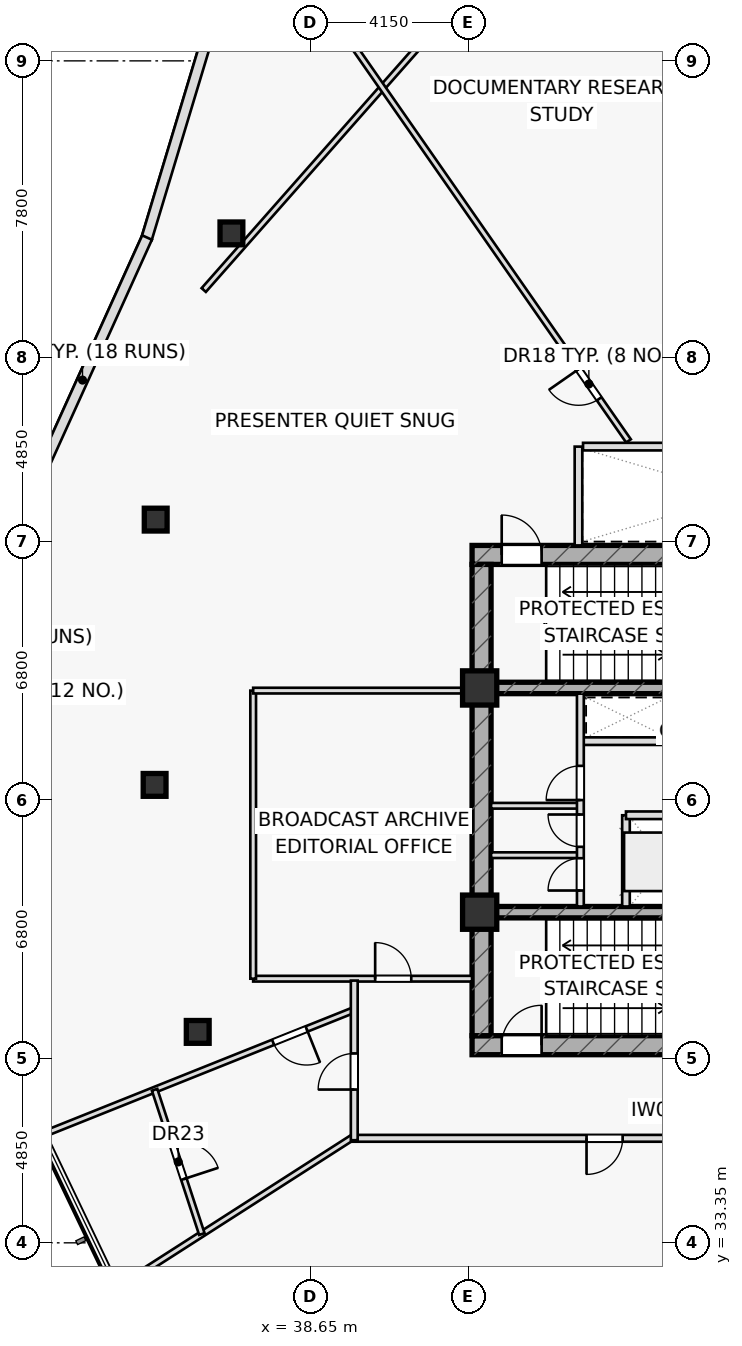
"""IFC4 building model, lengths in metres.
Left out: names, types, materials, properties, quantities, classifications, styles, units other than length and angle.
Written with IfcOpenShell. Run it as: python <this file> out.ifc"""

import sys

from ifc_helpers import new_model, si_unit, direction, frame, frame_2d, origin, origin_2d, place, context, subcontext, project, spatial, rectangle, hollow_rectangle, extrude, element, fill, save


model = new_model("IFC4")
c1 = context("Model", 3, precision=1e-05, world=origin(), true_north=direction((0.0, 1.0)))
c2 = subcontext(c1, "Body", "Model", "MODEL_VIEW")
j1 = project(units=[si_unit("LENGTHUNIT", "METRE"), si_unit("PLANEANGLEUNIT", "RADIAN")], contexts=[c1])
p1 = place(None, origin())
s1 = spatial("IfcSite", under=j1, at=p1, CompositionType="ELEMENT")
p2 = place(p1, origin())
s2 = spatial("IfcBuilding", under=s1, at=p2, CompositionType="ELEMENT")
p3 = place(p2, frame((0.0, 0.0, 161.8)))
s3 = spatial("IfcBuildingStorey", under=s2, at=p3, CompositionType="ELEMENT", Elevation=161.8)
p4 = place(p3, frame((42.9, 51.45, 0.0), z_axis=(0.0, 0.0, 1.0), x_axis=(1.0, 0.0, 0.0)))
e1 = element("IfcWall", 1, at=p4, inside=s3, PredefinedType="SHEAR", context=c2, shape_type="SweptSolid", body=[
    extrude(rectangle(XDim=14.2, YDim=0.5, at=frame_2d((7.1, 0.0))), origin(), (0.0, 0.0, 1.0), 3.55),
])
p5 = place(p4, frame((0.78, 0.0, 0.0)))
e2 = element("IfcOpeningElement", 2, at=p5, cuts=e1, PredefinedType="OPENING", context=c2, shape_type="SweptSolid", body=[
    extrude(rectangle(XDim=1.05, YDim=2.2, at=frame_2d((0.525, 1.1))), frame((0.0, 0.26, 0.0), z_axis=(0.0, -1.0, 0.0), x_axis=(1.0, 0.0, 0.0)), (0.0, 0.0, 1.0), 0.52),
])
p6 = place(p3, frame((42.9, 38.55, 0.0), z_axis=(0.0, 0.0, 1.0), x_axis=(1.0, 0.0, 0.0)))
e3 = element("IfcWall", 3, at=p6, inside=s3, PredefinedType="SHEAR", context=c2, shape_type="SweptSolid", body=[
    extrude(rectangle(XDim=14.2, YDim=0.5, at=frame_2d((7.1, 0.0))), origin(), (0.0, 0.0, 1.0), 3.55),
])
p7 = place(p6, frame((0.78, 0.0, 0.0)))
e4 = element("IfcOpeningElement", 4, at=p7, cuts=e3, PredefinedType="OPENING", context=c2, shape_type="SweptSolid", body=[
    extrude(rectangle(XDim=1.05, YDim=2.2, at=frame_2d((0.525, 1.1))), frame((0.0, 0.26, 0.0), z_axis=(0.0, -1.0, 0.0), x_axis=(1.0, 0.0, 0.0)), (0.0, 0.0, 1.0), 0.52),
])
p8 = place(p3, frame((43.15, 38.8, 0.0), z_axis=(0.0, 0.0, 1.0), x_axis=(0.0, 1.0, 0.0)))
e5 = element("IfcWall", 5, at=p8, inside=s3, PredefinedType="SHEAR", context=c2, shape_type="SweptSolid", body=[
    extrude(rectangle(XDim=12.4, YDim=0.5, at=frame_2d((6.2, 0.0))), origin(), (0.0, 0.0, 1.0), 3.55),
])
p9 = place(p3, frame((43.4, 47.95, 0.0), z_axis=(0.0, 0.0, 1.0), x_axis=(1.0, 0.0, 0.0)))
e6 = element("IfcWall", 6, at=p9, inside=s3, PredefinedType="SHEAR", context=c2, shape_type="SweptSolid", body=[
    extrude(rectangle(XDim=13.2, YDim=0.3, at=frame_2d((6.6, 0.0))), origin(), (0.0, 0.0, 1.0), 3.55),
])
p10 = place(p9, frame((8.345, 0.0, 0.0)))
e7 = element("IfcOpeningElement", 7, at=p10, cuts=e6, PredefinedType="OPENING", context=c2, shape_type="SweptSolid", body=[
    extrude(rectangle(XDim=1.15, YDim=2.2, at=frame_2d((0.575, 1.1))), frame((0.0, 0.16, 0.0), z_axis=(0.0, -1.0, 0.0), x_axis=(1.0, 0.0, 0.0)), (0.0, 0.0, 1.0), 0.32),
])
p11 = place(p9, frame((10.065, 0.0, 0.0)))
e8 = element("IfcOpeningElement", 8, at=p11, cuts=e6, PredefinedType="OPENING", context=c2, shape_type="SweptSolid", body=[
    extrude(rectangle(XDim=1.15, YDim=2.2, at=frame_2d((0.575, 1.1))), frame((0.0, 0.16, 0.0), z_axis=(0.0, -1.0, 0.0), x_axis=(1.0, 0.0, 0.0)), (0.0, 0.0, 1.0), 0.32),
])
p12 = place(p9, frame((11.645, 0.0, 0.0)))
e9 = element("IfcOpeningElement", 9, at=p12, cuts=e6, PredefinedType="OPENING", context=c2, shape_type="SweptSolid", body=[
    extrude(rectangle(XDim=1.15, YDim=2.2, at=frame_2d((0.575, 1.1))), frame((0.0, 0.16, 0.0), z_axis=(0.0, -1.0, 0.0), x_axis=(1.0, 0.0, 0.0)), (0.0, 0.0, 1.0), 0.32),
])
p13 = place(p3, frame((43.4, 42.05, 0.0), z_axis=(0.0, 0.0, 1.0), x_axis=(1.0, 0.0, 0.0)))
e10 = element("IfcWall", 10, at=p13, inside=s3, PredefinedType="SHEAR", context=c2, shape_type="SweptSolid", body=[
    extrude(rectangle(XDim=13.2, YDim=0.3, at=frame_2d((6.6, 0.0))), origin(), (0.0, 0.0, 1.0), 3.55),
])
p14 = place(p13, frame((8.37, 0.0, 0.0)))
e11 = element("IfcOpeningElement", 11, at=p14, cuts=e10, PredefinedType="OPENING", context=c2, shape_type="SweptSolid", body=[
    extrude(rectangle(XDim=1.1, YDim=2.15, at=frame_2d((0.55, 1.075))), frame((0.0, 0.16, 0.0), z_axis=(0.0, -1.0, 0.0), x_axis=(1.0, 0.0, 0.0)), (0.0, 0.0, 1.0), 0.32),
])
p15 = place(p13, frame((10.09, 0.0, 0.0)))
e12 = element("IfcOpeningElement", 12, at=p15, cuts=e10, PredefinedType="OPENING", context=c2, shape_type="SweptSolid", body=[
    extrude(rectangle(XDim=1.1, YDim=2.15, at=frame_2d((0.55, 1.075))), frame((0.0, 0.16, 0.0), z_axis=(0.0, -1.0, 0.0), x_axis=(1.0, 0.0, 0.0)), (0.0, 0.0, 1.0), 0.32),
])
p16 = place(p13, frame((11.83, 0.0, 0.0)))
e13 = element("IfcOpeningElement", 13, at=p16, cuts=e10, PredefinedType="OPENING", context=c2, shape_type="SweptSolid", body=[
    extrude(rectangle(XDim=1.1, YDim=2.15, at=frame_2d((0.55, 1.075))), frame((0.0, 0.16, 0.0), z_axis=(0.0, -1.0, 0.0), x_axis=(1.0, 0.0, 0.0)), (0.0, 0.0, 1.0), 0.32),
])
for number, where, z_axis, x_axis in (
    (14, (43.1, 47.95, 0.0), (0.0, 0.0, 1.0), (1.0, 0.0, 0.0)),
    (15, (43.1, 42.05, 0.0), (0.0, 0.0, 1.0), (1.0, 0.0, 0.0)),
):
    element("IfcColumn", number, at=place(p3, frame(where, z_axis=z_axis, x_axis=x_axis)), inside=s3, PredefinedType="COLUMN", context=c2, shape_type="SweptSolid", body=[
        extrude(rectangle(XDim=0.9, YDim=0.9, at=origin_2d()), origin(), (0.0, 0.0, 1.0), 3.55),
    ])
for number, where, z_axis, x_axis in (
    (16, (36.568, 59.911, 0.0), (0.0, 0.0, 1.0), (1.0, 0.0, 0.0)),
    (17, (34.575, 52.379, 0.0), (0.0, 0.0, 1.0), (1.0, 0.0, 0.0)),
    (18, (34.546, 45.399, 0.0), (0.0, 0.0, 1.0), (1.0, 0.0, 0.0)),
    (19, (35.681, 38.9, 0.0), (0.0, 0.0, 1.0), (1.0, 0.0, 0.0)),
):
    element("IfcColumn", number, at=place(p3, frame(where, z_axis=z_axis, x_axis=x_axis)), inside=s3, PredefinedType="COLUMN", context=c2, shape_type="SweptSolid", body=[
        extrude(hollow_rectangle(XDim=0.6, YDim=0.6, WallThickness=0.036, at=origin_2d()), origin(), (0.0, 0.0, 1.0), 3.55),
    ])
p17 = place(p3, frame((45.7, 51.7, 0.0), z_axis=(0.0, 0.0, 1.0), x_axis=(0.0, 1.0, 0.0)))
e20 = element("IfcWall", 20, at=p17, inside=s3, PredefinedType="PARTITIONING", context=c2, shape_type="SweptSolid", body=[
    extrude(rectangle(XDim=2.6, YDim=0.2, at=frame_2d((1.3, 0.0))), origin(), (0.0, 0.0, 1.0), 3.55),
])
p18 = place(p3, frame((45.75, 46.55, 0.0), z_axis=(0.0, 0.0, 1.0), x_axis=(1.0, 0.0, 0.0)))
e21 = element("IfcWall", 21, at=p18, inside=s3, PredefinedType="PARTITIONING", context=c2, shape_type="SweptSolid", body=[
    extrude(rectangle(XDim=2.4, YDim=0.2, at=frame_2d((1.2, 0.0))), origin(), (0.0, 0.0, 1.0), 3.55),
])
p19 = place(p3, frame((46.95, 42.2, 0.0), z_axis=(0.0, 0.0, 1.0), x_axis=(0.0, 1.0, 0.0)))
e22 = element("IfcWall", 22, at=p19, inside=s3, PredefinedType="PARTITIONING", context=c2, shape_type="SweptSolid", body=[
    extrude(rectangle(XDim=2.4, YDim=0.2, at=frame_2d((1.2, 0.0))), origin(), (0.0, 0.0, 1.0), 3.55),
])
p20 = place(p3, frame((46.95, 44.6, 0.0), z_axis=(0.0, 0.0, 1.0), x_axis=(1.0, 0.0, 0.0)))
e23 = element("IfcWall", 23, at=p20, inside=s3, PredefinedType="PARTITIONING", context=c2, shape_type="SweptSolid", body=[
    extrude(rectangle(XDim=2.05, YDim=0.2, at=frame_2d((1.025, 0.0))), origin(), (0.0, 0.0, 1.0), 3.55),
])
for number, where, z_axis, x_axis in (
    (24, (43.4, 43.55, 0.0), (0.0, 0.0, 1.0), (1.0, 0.0, 0.0)),
    (25, (43.4, 44.85, 0.0), (0.0, 0.0, 1.0), (1.0, 0.0, 0.0)),
):
    element("IfcWall", number, at=place(p3, frame(where, z_axis=z_axis, x_axis=x_axis)), inside=s3, PredefinedType="PARTITIONING", context=c2, shape_type="SweptSolid", body=[
        extrude(rectangle(XDim=2.35, YDim=0.15, at=frame_2d((1.175, 0.0))), origin(), (0.0, 0.0, 1.0), 3.55),
    ])
p21 = place(p3, frame((45.75, 42.2, 0.0), z_axis=(0.0, 0.0, 1.0), x_axis=(0.0, 1.0, 0.0)))
e26 = element("IfcWall", 26, at=p21, inside=s3, PredefinedType="PARTITIONING", context=c2, shape_type="SweptSolid", body=[
    extrude(rectangle(XDim=5.6, YDim=0.18, at=frame_2d((2.8, 0.0))), origin(), (0.0, 0.0, 1.0), 3.55),
])
p22 = place(p21, frame((0.42, 0.0, 0.0)))
e27 = element("IfcOpeningElement", 27, at=p22, cuts=e26, PredefinedType="OPENING", context=c2, shape_type="SweptSolid", body=[
    extrude(rectangle(XDim=0.85, YDim=2.05, at=frame_2d((0.425, 1.025))), frame((0.0, 0.1, 0.0), z_axis=(0.0, -1.0, 0.0), x_axis=(1.0, 0.0, 0.0)), (0.0, 0.0, 1.0), 0.2),
])
p23 = place(p21, frame((1.57, 0.0, 0.0)))
e28 = element("IfcOpeningElement", 28, at=p23, cuts=e26, PredefinedType="OPENING", context=c2, shape_type="SweptSolid", body=[
    extrude(rectangle(XDim=0.85, YDim=2.05, at=frame_2d((0.425, 1.025))), frame((0.0, 0.1, 0.0), z_axis=(0.0, -1.0, 0.0), x_axis=(1.0, 0.0, 0.0)), (0.0, 0.0, 1.0), 0.2),
])
p24 = place(p21, frame((2.8, 0.0, 0.0)))
e29 = element("IfcOpeningElement", 29, at=p24, cuts=e26, PredefinedType="OPENING", context=c2, shape_type="SweptSolid", body=[
    extrude(rectangle(XDim=0.9, YDim=2.05, at=frame_2d((0.45, 1.025))), frame((0.0, 0.1, 0.0), z_axis=(0.0, -1.0, 0.0), x_axis=(1.0, 0.0, 0.0)), (0.0, 0.0, 1.0), 0.2),
])
p25 = place(p3, frame((43.4, 66.989, 0.0), z_axis=(0.0, 0.0, 1.0), x_axis=(-0.661622343701, -0.749837231881, 0.0)))
e30 = element("IfcWall", 30, at=p25, inside=s3, PredefinedType="PARTITIONING", context=c2, shape_type="SweptSolid", body=[
    extrude(rectangle(XDim=11.427, YDim=0.15, at=frame_2d((5.714, 0.0))), origin(), (0.0, 0.0, 1.0), 2.935),
])
p26 = place(p3, frame((37.14, 40.3, 0.0), z_axis=(0.0, 0.0, 1.0), x_axis=(1.0, 0.0, 0.0)))
e31 = element("IfcWall", 31, at=p26, inside=s3, PredefinedType="PARTITIONING", context=c2, shape_type="SweptSolid", body=[
    extrude(rectangle(XDim=5.76, YDim=0.15, at=frame_2d((2.88, 0.0))), origin(), (0.0, 0.0, 1.0), 3.55),
])
p27 = place(p26, frame((3.21, 0.0, 0.0)))
e32 = element("IfcOpeningElement", 32, at=p27, cuts=e31, PredefinedType="OPENING", context=c2, shape_type="SweptSolid", body=[
    extrude(rectangle(XDim=0.95, YDim=2.05, at=frame_2d((0.475, 1.025))), frame((0.0, 0.085, 0.0), z_axis=(0.0, -1.0, 0.0), x_axis=(1.0, 0.0, 0.0)), (0.0, 0.0, 1.0), 0.17),
])
p28 = place(p3, frame((37.14, 40.3, 0.0), z_axis=(0.0, 0.0, 1.0), x_axis=(0.0, 1.0, 0.0)))
e33 = element("IfcWall", 33, at=p28, inside=s3, PredefinedType="PARTITIONING", context=c2, shape_type="SweptSolid", body=[
    extrude(rectangle(XDim=7.58, YDim=0.15, at=frame_2d((3.79, 0.0))), origin(), (0.0, 0.0, 1.0), 2.935),
])
p29 = place(p3, frame((37.14, 47.88, 0.0), z_axis=(0.0, 0.0, 1.0), x_axis=(1.0, 0.0, 0.0)))
e34 = element("IfcWall", 34, at=p29, inside=s3, PredefinedType="PARTITIONING", context=c2, shape_type="SweptSolid", body=[
    extrude(rectangle(XDim=5.76, YDim=0.15, at=frame_2d((2.88, 0.0))), origin(), (0.0, 0.0, 1.0), 2.935),
])
p30 = place(p3, frame((51.244, 54.45, 0.0), z_axis=(0.0, 0.0, 1.0), x_axis=(-0.241921992863, 0.970295702025, 0.0)))
e35 = element("IfcWall", 35, at=p30, inside=s3, PredefinedType="PARTITIONING", context=c2, shape_type="SweptSolid", body=[
    extrude(rectangle(XDim=15.541, YDim=0.15, at=frame_2d((7.771, 0.0))), origin(), (0.0, 0.0, 1.0), 3.025),
])
p31 = place(p3, frame((47.017, 54.45, 0.0), z_axis=(0.0, 0.0, 1.0), x_axis=(-0.571606219405, 0.82052807992, 0.0)))
e36 = element("IfcWall", 36, at=p31, inside=s3, PredefinedType="PARTITIONING", context=c2, shape_type="SweptSolid", body=[
    extrude(rectangle(XDim=17.228, YDim=0.15, at=frame_2d((8.614, 0.0))), origin(), (0.0, 0.0, 1.0), 2.935),
])
p32 = place(p31, frame((1.35, 0.0, 0.0)))
e37 = element("IfcOpeningElement", 37, at=p32, cuts=e36, PredefinedType="OPENING", context=c2, shape_type="SweptSolid", body=[
    extrude(rectangle(XDim=0.95, YDim=2.05, at=frame_2d((0.475, 1.025))), frame((0.0, 0.085, 0.0), z_axis=(0.0, -1.0, 0.0), x_axis=(1.0, 0.0, 0.0)), (0.0, 0.0, 1.0), 0.17),
])
p33 = place(p3, frame((39.8, 39.479, 0.0), z_axis=(0.0, 0.0, 1.0), x_axis=(-0.928461453954, -0.371428766416, 0.0)))
e38 = element("IfcWall", 38, at=p33, inside=s3, PredefinedType="PARTITIONING", context=c2, shape_type="SweptSolid", body=[
    extrude(rectangle(XDim=8.841, YDim=0.15, at=frame_2d((4.42, 0.0))), origin(), (0.0, 0.0, 1.0), 2.935),
])
p34 = place(p33, frame((1.35, 0.0, 0.0)))
e39 = element("IfcOpeningElement", 39, at=p34, cuts=e38, PredefinedType="OPENING", context=c2, shape_type="SweptSolid", body=[
    extrude(rectangle(XDim=0.95, YDim=2.05, at=frame_2d((0.475, 1.025))), frame((0.0, 0.085, 0.0), z_axis=(0.0, -1.0, 0.0), x_axis=(1.0, 0.0, 0.0)), (0.0, 0.0, 1.0), 0.17),
])
p35 = place(p3, frame((39.8, 36.152, 0.0), z_axis=(0.0, 0.0, 1.0), x_axis=(-0.841822586313, -0.539754326683, 0.0)))
e40 = element("IfcWall", 40, at=p35, inside=s3, PredefinedType="PARTITIONING", context=c2, shape_type="SweptSolid", body=[
    extrude(rectangle(XDim=7.444, YDim=0.15, at=frame_2d((3.722, 0.0))), origin(), (0.0, 0.0, 1.0), 3.025),
])
p36 = place(p3, frame((34.547, 37.378, 0.0), z_axis=(0.0, 0.0, 1.0), x_axis=(0.311126376448, -0.950368548447, 0.0)))
e41 = element("IfcWall", 41, at=p36, inside=s3, PredefinedType="PARTITIONING", context=c2, shape_type="SweptSolid", body=[
    extrude(rectangle(XDim=3.995, YDim=0.15, at=frame_2d((1.998, 0.0))), origin(), (0.0, 0.0, 1.0), 3.55),
])
p37 = place(p36, frame((1.522, 0.0, 0.0)))
e42 = element("IfcOpeningElement", 42, at=p37, cuts=e41, PredefinedType="OPENING", context=c2, shape_type="SweptSolid", body=[
    extrude(rectangle(XDim=0.95, YDim=2.05, at=frame_2d((0.475, 1.025))), frame((0.0, 0.085, 0.0), z_axis=(0.0, -1.0, 0.0), x_axis=(1.0, 0.0, 0.0)), (0.0, 0.0, 1.0), 0.17),
])
p38 = place(p3, frame((59.35, 36.1, 0.0), z_axis=(0.0, 0.0, 1.0), x_axis=(-1.0, 0.0, 0.0)))
e43 = element("IfcWall", 43, at=p38, inside=s3, PredefinedType="PARTITIONING", context=c2, shape_type="SweptSolid", body=[
    extrude(rectangle(XDim=19.6, YDim=0.18, at=frame_2d((9.8, 0.0))), origin(), (0.0, 0.0, 1.0), 2.935),
])
p39 = place(p38, frame((2.923, 0.0, 0.0)))
e44 = element("IfcOpeningElement", 44, at=p39, cuts=e43, PredefinedType="OPENING", context=c2, shape_type="SweptSolid", body=[
    extrude(rectangle(XDim=0.95, YDim=2.05, at=frame_2d((0.475, 1.025))), frame((0.0, 0.1, 0.0), z_axis=(0.0, -1.0, 0.0), x_axis=(1.0, 0.0, 0.0)), (0.0, 0.0, 1.0), 0.2),
])
p40 = place(p38, frame((12.488, 0.0, 0.0)))
e45 = element("IfcOpeningElement", 45, at=p40, cuts=e43, PredefinedType="OPENING", context=c2, shape_type="SweptSolid", body=[
    extrude(rectangle(XDim=0.95, YDim=2.05, at=frame_2d((0.475, 1.025))), frame((0.0, 0.1, 0.0), z_axis=(0.0, -1.0, 0.0), x_axis=(1.0, 0.0, 0.0)), (0.0, 0.0, 1.0), 0.2),
])
p41 = place(p3, frame((39.8, 36.05, 0.0), z_axis=(0.0, 0.0, 1.0), x_axis=(0.0, 1.0, 0.0)))
e46 = element("IfcWall", 46, at=p41, inside=s3, PredefinedType="PARTITIONING", context=c2, shape_type="SweptSolid", body=[
    extrude(rectangle(XDim=4.2, YDim=0.18, at=frame_2d((2.1, 0.0))), origin(), (0.0, 0.0, 1.0), 2.935),
])
p42 = place(p41, frame((1.333, 0.0, 0.0)))
e47 = element("IfcOpeningElement", 47, at=p42, cuts=e46, PredefinedType="OPENING", context=c2, shape_type="SweptSolid", body=[
    extrude(rectangle(XDim=0.95, YDim=2.05, at=frame_2d((0.475, 1.025))), frame((0.0, 0.1, 0.0), z_axis=(0.0, -1.0, 0.0), x_axis=(1.0, 0.0, 0.0)), (0.0, 0.0, 1.0), 0.2),
])
p43 = place(p3, frame((36.537, 67.07, 0.0), z_axis=(0.0, 0.0, 1.0), x_axis=(-0.288646706332, -0.95743567874, 0.0)))
e48 = element("IfcWall", 48, at=p43, inside=s3, PredefinedType="STANDARD", context=c2, shape_type="SweptSolid", body=[
    extrude(rectangle(XDim=7.621, YDim=0.28, at=frame_2d((3.811, 0.0))), origin(), (0.0, 0.0, 1.0), 3.55),
])
p44 = place(p3, frame((34.347, 59.802, 0.0), z_axis=(0.0, 0.0, 1.0), x_axis=(-0.412381746659, -0.911011138802, 0.0)))
e49 = element("IfcWall", 49, at=p44, inside=s3, PredefinedType="STANDARD", context=c2, shape_type="SweptSolid", body=[
    extrude(rectangle(XDim=8.234, YDim=0.28, at=frame_2d((4.117, 0.0))), origin(), (0.0, 0.0, 1.0), 3.55),
])
p45 = place(p3, frame((45.82, 54.3, 0.0), z_axis=(0.0, 0.0, 1.0), x_axis=(1.0, 0.0, 0.0)))
e50 = element("IfcWall", 50, at=p45, inside=s3, PredefinedType="PARTITIONING", context=c2, shape_type="SweptSolid", body=[
    extrude(rectangle(XDim=8.31, YDim=0.2, at=frame_2d((4.155, 0.0))), origin(), (0.0, 0.0, 1.0), 3.55),
])
p46 = place(p5, origin())
e51 = element("IfcDoor", 51, at=p46, inside=s3, OperationType="SINGLE_SWING_LEFT", PredefinedType="DOOR", context=c2, shape_type="SweptSolid", body=[
    extrude(rectangle(XDim=1.05, YDim=2.2, at=frame_2d((0.525, 1.1))), frame((0.0, 0.025, 0.0), z_axis=(0.0, -1.0, 0.0), x_axis=(1.0, 0.0, 0.0)), (0.0, 0.0, 1.0), 0.05),
])
fill(e2, e51)
p47 = place(p7, origin())
e52 = element("IfcDoor", 52, at=p47, inside=s3, OperationType="SINGLE_SWING_RIGHT", PredefinedType="DOOR", context=c2, shape_type="SweptSolid", body=[
    extrude(rectangle(XDim=1.05, YDim=2.2, at=frame_2d((0.525, 1.1))), frame((0.0, 0.025, 0.0), z_axis=(0.0, -1.0, 0.0), x_axis=(1.0, 0.0, 0.0)), (0.0, 0.0, 1.0), 0.05),
])
fill(e4, e52)
p48 = place(p22, origin())
e53 = element("IfcDoor", 53, at=p48, inside=s3, OperationType="SINGLE_SWING_LEFT", PredefinedType="DOOR", context=c2, shape_type="SweptSolid", body=[
    extrude(rectangle(XDim=0.85, YDim=2.05, at=frame_2d((0.425, 1.025))), frame((0.0, 0.025, 0.0), z_axis=(0.0, -1.0, 0.0), x_axis=(1.0, 0.0, 0.0)), (0.0, 0.0, 1.0), 0.05),
])
fill(e27, e53)
p49 = place(p23, origin())
e54 = element("IfcDoor", 54, at=p49, inside=s3, OperationType="SINGLE_SWING_RIGHT", PredefinedType="DOOR", context=c2, shape_type="SweptSolid", body=[
    extrude(rectangle(XDim=0.85, YDim=2.05, at=frame_2d((0.425, 1.025))), frame((0.0, 0.025, 0.0), z_axis=(0.0, -1.0, 0.0), x_axis=(1.0, 0.0, 0.0)), (0.0, 0.0, 1.0), 0.05),
])
fill(e28, e54)
p50 = place(p24, origin())
e55 = element("IfcDoor", 55, at=p50, inside=s3, OperationType="SINGLE_SWING_LEFT", PredefinedType="DOOR", context=c2, shape_type="SweptSolid", body=[
    extrude(rectangle(XDim=0.9, YDim=2.05, at=frame_2d((0.45, 1.025))), frame((0.0, 0.025, 0.0), z_axis=(0.0, -1.0, 0.0), x_axis=(1.0, 0.0, 0.0)), (0.0, 0.0, 1.0), 0.05),
])
fill(e29, e55)
p51 = place(p27, origin())
e56 = element("IfcDoor", 56, at=p51, inside=s3, OperationType="SINGLE_SWING_LEFT", PredefinedType="DOOR", context=c2, shape_type="SweptSolid", body=[
    extrude(rectangle(XDim=0.95, YDim=2.05, at=frame_2d((0.475, 1.025))), frame((0.0, 0.025, 0.0), z_axis=(0.0, -1.0, 0.0), x_axis=(1.0, 0.0, 0.0)), (0.0, 0.0, 1.0), 0.05),
])
fill(e32, e56)
p52 = place(p32, origin())
e57 = element("IfcDoor", 57, at=p52, inside=s3, OperationType="SINGLE_SWING_RIGHT", PredefinedType="DOOR", context=c2, shape_type="SweptSolid", body=[
    extrude(rectangle(XDim=0.95, YDim=2.05, at=frame_2d((0.475, 1.025))), frame((0.0, 0.025, 0.0), z_axis=(0.0, -1.0, 0.0), x_axis=(1.0, 0.0, 0.0)), (0.0, 0.0, 1.0), 0.05),
])
fill(e37, e57)
p53 = place(p34, origin())
e58 = element("IfcDoor", 58, at=p53, inside=s3, OperationType="SINGLE_SWING_LEFT", PredefinedType="DOOR", context=c2, shape_type="SweptSolid", body=[
    extrude(rectangle(XDim=0.95, YDim=2.05, at=frame_2d((0.475, 1.025))), frame((0.0, 0.025, 0.0), z_axis=(0.0, -1.0, 0.0), x_axis=(1.0, 0.0, 0.0)), (0.0, 0.0, 1.0), 0.05),
])
fill(e39, e58)
p54 = place(p37, origin())
e59 = element("IfcDoor", 59, at=p54, inside=s3, OperationType="SINGLE_SWING_RIGHT", PredefinedType="DOOR", context=c2, shape_type="SweptSolid", body=[
    extrude(rectangle(XDim=0.95, YDim=2.05, at=frame_2d((0.475, 1.025))), frame((0.0, 0.025, 0.0), z_axis=(0.0, -1.0, 0.0), x_axis=(1.0, 0.0, 0.0)), (0.0, 0.0, 1.0), 0.05),
])
fill(e42, e59)
p55 = place(p40, origin())
e60 = element("IfcDoor", 60, at=p55, inside=s3, OperationType="SINGLE_SWING_RIGHT", PredefinedType="DOOR", context=c2, shape_type="SweptSolid", body=[
    extrude(rectangle(XDim=0.95, YDim=2.05, at=frame_2d((0.475, 1.025))), frame((0.0, 0.025, 0.0), z_axis=(0.0, -1.0, 0.0), x_axis=(1.0, 0.0, 0.0)), (0.0, 0.0, 1.0), 0.05),
])
fill(e45, e60)
p56 = place(p42, origin())
e61 = element("IfcDoor", 61, at=p56, inside=s3, OperationType="SINGLE_SWING_LEFT", PredefinedType="DOOR", context=c2, shape_type="SweptSolid", body=[
    extrude(rectangle(XDim=0.95, YDim=2.05, at=frame_2d((0.475, 1.025))), frame((0.0, 0.025, 0.0), z_axis=(0.0, -1.0, 0.0), x_axis=(1.0, 0.0, 0.0)), (0.0, 0.0, 1.0), 0.05),
])
fill(e47, e61)
save(model, sys.argv[1])
